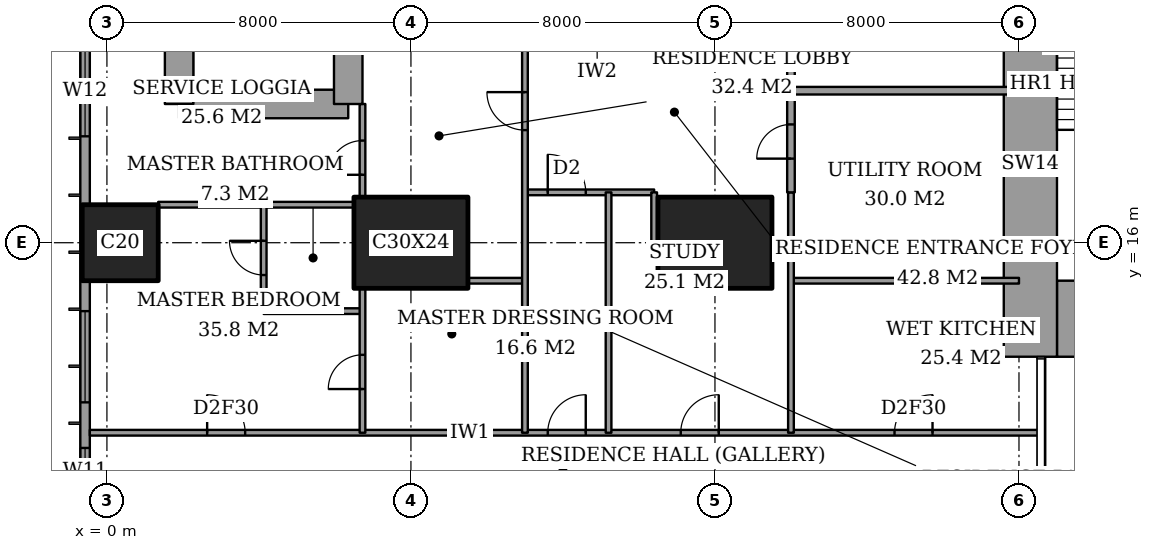
"""IFC4 building model, lengths in metres.
Left out: names, types, materials, properties, quantities, classifications, styles, units other than length and angle.
Written with IfcOpenShell. Run it as: python <this file> out.ifc"""

import sys

from ifc_helpers import new_model, si_unit, direction, frame, frame_2d, origin, origin_2d, place, context, subcontext, project, spatial, rectangle, extrude, element, fill, save


model = new_model("IFC4")
c1 = context("Model", 3, precision=1e-05, world=origin(), true_north=direction((0.0, 1.0)))
c2 = subcontext(c1, "Body", "Model", "MODEL_VIEW")
j1 = project(units=[si_unit("LENGTHUNIT", "METRE"), si_unit("PLANEANGLEUNIT", "RADIAN")], contexts=[c1])
p1 = place(None, origin())
s1 = spatial("IfcSite", under=j1, at=p1, CompositionType="ELEMENT")
p2 = place(p1, origin())
s2 = spatial("IfcBuilding", under=s1, at=p2, CompositionType="ELEMENT")
p3 = place(p2, frame((0.0, 0.0, 146.6)))
s3 = spatial("IfcBuildingStorey", under=s2, at=p3, CompositionType="ELEMENT", Elevation=146.6)
p4 = place(p3, frame((0.35, 16.0, 0.0), z_axis=(0.0, 0.0, 1.0), x_axis=(1.0, 0.0, 0.0)))
e1 = element("IfcColumn", 1, at=p4, inside=s3, PredefinedType="COLUMN", context=c2, shape_type="SweptSolid", body=[
    extrude(rectangle(XDim=2.0, YDim=2.0, at=origin_2d()), origin(), (0.0, 0.0, 1.0), 3.6),
])
for number, where, z_axis, x_axis in (
    (2, (8.0, 16.0, 0.0), (0.0, 0.0, 1.0), (1.0, 0.0, 0.0)),
    (3, (16.0, 16.0, 0.0), (0.0, 0.0, 1.0), (1.0, 0.0, 0.0)),
):
    element("IfcColumn", number, at=place(p3, frame(where, z_axis=z_axis, x_axis=x_axis)), inside=s3, PredefinedType="COLUMN", context=c2, shape_type="SweptSolid", body=[
        extrude(rectangle(XDim=3.0, YDim=2.4, at=origin_2d()), origin(), (0.0, 0.0, 1.0), 3.6),
    ])
p5 = place(p3, frame((25.0, 14.0, 0.0), z_axis=(0.0, 0.0, 1.0), x_axis=(1.0, 0.0, 0.0)))
e4 = element("IfcWall", 4, at=p5, inside=s3, PredefinedType="SHEAR", context=c2, shape_type="SweptSolid", body=[
    extrude(rectangle(XDim=3.15, YDim=2.0, at=frame_2d((1.575, 0.0))), origin(), (0.0, 0.0, 1.0), 3.6),
])
p6 = place(p3, frame((24.3, 13.0, 0.0), z_axis=(0.0, 0.0, 1.0), x_axis=(0.0, 1.0, 0.0)))
e5 = element("IfcWall", 5, at=p6, inside=s3, PredefinedType="SHEAR", context=c2, shape_type="SweptSolid", body=[
    extrude(rectangle(XDim=10.15, YDim=1.4, at=frame_2d((5.075, 0.0))), origin(), (0.0, 0.0, 1.0), 3.6),
])
p7 = place(p3, frame((1.9, 19.65, 0.0), z_axis=(0.0, 0.0, 1.0), x_axis=(1.0, 0.0, 0.0)))
e6 = element("IfcWall", 6, at=p7, inside=s3, PredefinedType="SHEAR", context=c2, shape_type="SweptSolid", body=[
    extrude(rectangle(XDim=4.45, YDim=0.75, at=frame_2d((2.225, 0.0))), origin(), (0.0, 0.0, 1.0), 3.6),
])
p8 = place(p3, frame((6.35, 19.65, 0.0), z_axis=(0.0, 0.0, 1.0), x_axis=(0.0, 1.0, 0.0)))
e7 = element("IfcWall", 7, at=p8, inside=s3, PredefinedType="SHEAR", context=c2, shape_type="SweptSolid", body=[
    extrude(rectangle(XDim=8.7, YDim=0.75, at=frame_2d((4.35, 0.0))), origin(), (0.0, 0.0, 1.0), 3.6),
])
p9 = place(p8, frame((6.725, 0.0, 0.0)))
e8 = element("IfcOpeningElement", 8, at=p9, cuts=e7, PredefinedType="OPENING", context=c2, shape_type="SweptSolid", body=[
    extrude(rectangle(XDim=1.0, YDim=2.1, at=frame_2d((0.5, 1.05))), frame((0.0, 0.385, 0.0), z_axis=(0.0, -1.0, 0.0), x_axis=(1.0, 0.0, 0.0)), (0.0, 0.0, 1.0), 0.77),
])
p10 = place(p3, frame((1.9, 28.35, 0.0), z_axis=(0.0, 0.0, 1.0), x_axis=(0.0, -1.0, 0.0)))
e9 = element("IfcWall", 9, at=p10, inside=s3, PredefinedType="SHEAR", context=c2, shape_type="SweptSolid", body=[
    extrude(rectangle(XDim=8.7, YDim=0.75, at=frame_2d((4.35, 0.0))), origin(), (0.0, 0.0, 1.0), 3.6),
])
p11 = place(p3, frame((-0.575, 44.825, 0.0), z_axis=(0.0, 0.0, 1.0), x_axis=(0.0, -1.0, 0.0)))
e10 = element("IfcWall", 10, at=p11, inside=s3, PredefinedType="SOLIDWALL", context=c2, shape_type="SweptSolid", body=[
    extrude(rectangle(XDim=41.65, YDim=0.25, at=frame_2d((20.825, 0.0))), origin(), (0.0, 0.0, 1.0), 3.6),
])
p12 = place(p11, frame((0.775, 0.0, 0.4)))
e11 = element("IfcOpeningElement", 11, at=p12, cuts=e10, PredefinedType="OPENING", context=c2, shape_type="SweptSolid", body=[
    extrude(rectangle(XDim=2.4, YDim=2.2, at=frame_2d((1.2, 1.1))), frame((0.0, 0.135, 0.0), z_axis=(0.0, -1.0, 0.0), x_axis=(1.0, 0.0, 0.0)), (0.0, 0.0, 1.0), 0.27),
])
p13 = place(p11, frame((6.1, 0.0, 0.4)))
e12 = element("IfcOpeningElement", 12, at=p13, cuts=e10, PredefinedType="OPENING", context=c2, shape_type="SweptSolid", body=[
    extrude(rectangle(XDim=1.2, YDim=2.2, at=frame_2d((0.6, 1.1))), frame((0.0, 0.135, 0.0), z_axis=(0.0, -1.0, 0.0), x_axis=(1.0, 0.0, 0.0)), (0.0, 0.0, 1.0), 0.27),
])
p14 = place(p11, frame((8.425, 0.0, 0.4)))
e13 = element("IfcOpeningElement", 13, at=p14, cuts=e10, PredefinedType="OPENING", context=c2, shape_type="SweptSolid", body=[
    extrude(rectangle(XDim=2.4, YDim=2.2, at=frame_2d((1.2, 1.1))), frame((0.0, 0.135, 0.0), z_axis=(0.0, -1.0, 0.0), x_axis=(1.0, 0.0, 0.0)), (0.0, 0.0, 1.0), 0.27),
])
p15 = place(p11, frame((15.625, 0.0, 0.4)))
e14 = element("IfcOpeningElement", 14, at=p15, cuts=e10, PredefinedType="OPENING", context=c2, shape_type="SweptSolid", body=[
    extrude(rectangle(XDim=2.4, YDim=2.2, at=frame_2d((1.2, 1.1))), frame((0.0, 0.135, 0.0), z_axis=(0.0, -1.0, 0.0), x_axis=(1.0, 0.0, 0.0)), (0.0, 0.0, 1.0), 0.27),
])
p16 = place(p11, frame((23.625, 0.0, 0.4)))
e15 = element("IfcOpeningElement", 15, at=p16, cuts=e10, PredefinedType="OPENING", context=c2, shape_type="SweptSolid", body=[
    extrude(rectangle(XDim=2.4, YDim=2.2, at=frame_2d((1.2, 1.1))), frame((0.0, 0.135, 0.0), z_axis=(0.0, -1.0, 0.0), x_axis=(1.0, 0.0, 0.0)), (0.0, 0.0, 1.0), 0.27),
])
p17 = place(p11, frame((30.625, 0.0, 0.4)))
e16 = element("IfcOpeningElement", 16, at=p17, cuts=e10, PredefinedType="OPENING", context=c2, shape_type="SweptSolid", body=[
    extrude(rectangle(XDim=2.4, YDim=2.2, at=frame_2d((1.2, 1.1))), frame((0.0, 0.135, 0.0), z_axis=(0.0, -1.0, 0.0), x_axis=(1.0, 0.0, 0.0)), (0.0, 0.0, 1.0), 0.27),
])
p18 = place(p11, frame((34.225, 0.0, 0.4)))
e17 = element("IfcOpeningElement", 17, at=p18, cuts=e10, PredefinedType="OPENING", context=c2, shape_type="SweptSolid", body=[
    extrude(rectangle(XDim=1.2, YDim=2.2, at=frame_2d((0.6, 1.1))), frame((0.0, 0.135, 0.0), z_axis=(0.0, -1.0, 0.0), x_axis=(1.0, 0.0, 0.0)), (0.0, 0.0, 1.0), 0.27),
])
p19 = place(p11, frame((38.475, 0.0, 0.4)))
e18 = element("IfcOpeningElement", 18, at=p19, cuts=e10, PredefinedType="OPENING", context=c2, shape_type="SweptSolid", body=[
    extrude(rectangle(XDim=2.4, YDim=2.2, at=frame_2d((1.2, 1.1))), frame((0.0, 0.135, 0.0), z_axis=(0.0, -1.0, 0.0), x_axis=(1.0, 0.0, 0.0)), (0.0, 0.0, 1.0), 0.27),
])
p20 = place(p3, frame((-0.45, 11.0, 0.0), z_axis=(0.0, 0.0, 1.0), x_axis=(1.0, 0.0, 0.0)))
e19 = element("IfcWall", 19, at=p20, inside=s3, PredefinedType="PARTITIONING", context=c2, shape_type="SweptSolid", body=[
    extrude(rectangle(XDim=25.011, YDim=0.15, at=frame_2d((12.505, 0.0))), origin(), (0.0, 0.0, 1.0), 3.35),
])
p21 = place(p20, frame((12.05, 0.0, 0.0)))
e20 = element("IfcOpeningElement", 20, at=p21, cuts=e19, PredefinedType="OPENING", context=c2, shape_type="SweptSolid", body=[
    extrude(rectangle(XDim=1.0, YDim=2.1, at=frame_2d((0.5, 1.05))), frame((0.0, 0.085, 0.0), z_axis=(0.0, -1.0, 0.0), x_axis=(1.0, 0.0, 0.0)), (0.0, 0.0, 1.0), 0.17),
])
p22 = place(p20, frame((3.087, 0.0, 0.0)))
e21 = element("IfcOpeningElement", 21, at=p22, cuts=e19, PredefinedType="OPENING", context=c2, shape_type="SweptSolid", body=[
    extrude(rectangle(XDim=1.0, YDim=2.1, at=frame_2d((0.5, 1.05))), frame((0.0, 0.085, 0.0), z_axis=(0.0, -1.0, 0.0), x_axis=(1.0, 0.0, 0.0)), (0.0, 0.0, 1.0), 0.17),
])
p23 = place(p20, frame((15.55, 0.0, 0.0)))
e22 = element("IfcOpeningElement", 22, at=p23, cuts=e19, PredefinedType="OPENING", context=c2, shape_type="SweptSolid", body=[
    extrude(rectangle(XDim=1.0, YDim=2.1, at=frame_2d((0.5, 1.05))), frame((0.0, 0.085, 0.0), z_axis=(0.0, -1.0, 0.0), x_axis=(1.0, 0.0, 0.0)), (0.0, 0.0, 1.0), 0.17),
])
p24 = place(p20, frame((21.175, 0.0, 0.0)))
e23 = element("IfcOpeningElement", 23, at=p24, cuts=e19, PredefinedType="OPENING", context=c2, shape_type="SweptSolid", body=[
    extrude(rectangle(XDim=1.0, YDim=2.1, at=frame_2d((0.5, 1.05))), frame((0.0, 0.085, 0.0), z_axis=(0.0, -1.0, 0.0), x_axis=(1.0, 0.0, 0.0)), (0.0, 0.0, 1.0), 0.17),
])
p25 = place(p3, frame((4.125, 14.2, 0.0), z_axis=(0.0, 0.0, 1.0), x_axis=(1.0, 0.0, 0.0)))
e24 = element("IfcWall", 24, at=p25, inside=s3, PredefinedType="PARTITIONING", context=c2, shape_type="SweptSolid", body=[
    extrude(rectangle(XDim=2.6, YDim=0.15, at=frame_2d((1.3, 0.0))), origin(), (0.0, 0.0, 1.0), 3.35),
])
p26 = place(p3, frame((9.5, 15.0, 0.0), z_axis=(0.0, 0.0, 1.0), x_axis=(1.0, 0.0, 0.0)))
e25 = element("IfcWall", 25, at=p26, inside=s3, PredefinedType="PARTITIONING", context=c2, shape_type="SweptSolid", body=[
    extrude(rectangle(XDim=1.5, YDim=0.15, at=frame_2d((0.75, 0.0))), origin(), (0.0, 0.0, 1.0), 3.35),
])
p27 = place(p3, frame((18.0, 15.0, 0.0), z_axis=(0.0, 0.0, 1.0), x_axis=(1.0, 0.0, 0.0)))
e26 = element("IfcWall", 26, at=p27, inside=s3, PredefinedType="PARTITIONING", context=c2, shape_type="SweptSolid", body=[
    extrude(rectangle(XDim=6.0, YDim=0.15, at=frame_2d((3.0, 0.0))), origin(), (0.0, 0.0, 1.0), 3.35),
])
p28 = place(p3, frame((17.5, 15.875, 0.0), z_axis=(0.0, 0.0, 1.0), x_axis=(1.0, 0.0, 0.0)))
e27 = element("IfcWall", 27, at=p28, inside=s3, PredefinedType="PARTITIONING", context=c2, shape_type="SweptSolid", body=[
    extrude(rectangle(XDim=0.5, YDim=0.15, at=frame_2d((0.25, 0.0))), origin(), (0.0, 0.0, 1.0), 2.634),
])
p29 = place(p3, frame((1.35, 17.0, 0.0), z_axis=(0.0, 0.0, 1.0), x_axis=(1.0, 0.0, 0.0)))
e28 = element("IfcWall", 28, at=p29, inside=s3, PredefinedType="PARTITIONING", context=c2, shape_type="SweptSolid", body=[
    extrude(rectangle(XDim=5.15, YDim=0.15, at=frame_2d((2.575, 0.0))), origin(), (0.0, 0.0, 1.0), 3.35),
])
p30 = place(p3, frame((11.0, 17.325, 0.0), z_axis=(0.0, 0.0, 1.0), x_axis=(1.0, 0.0, 0.0)))
e29 = element("IfcWall", 29, at=p30, inside=s3, PredefinedType="PARTITIONING", context=c2, shape_type="SweptSolid", body=[
    extrude(rectangle(XDim=3.4, YDim=0.15, at=frame_2d((1.7, 0.0))), origin(), (0.0, 0.0, 1.0), 3.35),
])
p31 = place(p30, frame((0.6, 0.0, 0.0)))
e30 = element("IfcOpeningElement", 30, at=p31, cuts=e29, PredefinedType="OPENING", context=c2, shape_type="SweptSolid", body=[
    extrude(rectangle(XDim=1.0, YDim=2.1, at=frame_2d((0.5, 1.05))), frame((0.0, 0.085, 0.0), z_axis=(0.0, -1.0, 0.0), x_axis=(1.0, 0.0, 0.0)), (0.0, 0.0, 1.0), 0.17),
])
p32 = place(p3, frame((18.0, 20.0, 0.0), z_axis=(0.0, 0.0, 1.0), x_axis=(1.0, 0.0, 0.0)))
e31 = element("IfcWall", 31, at=p32, inside=s3, PredefinedType="PARTITIONING", context=c2, shape_type="SweptSolid", body=[
    extrude(rectangle(XDim=6.0, YDim=0.2, at=frame_2d((3.0, 0.0))), origin(), (0.0, 0.0, 1.0), 3.35),
])
p33 = place(p3, frame((4.125, 14.2, 0.0), z_axis=(0.0, 0.0, 1.0), x_axis=(0.0, 1.0, 0.0)))
e32 = element("IfcWall", 32, at=p33, inside=s3, PredefinedType="PARTITIONING", context=c2, shape_type="SweptSolid", body=[
    extrude(rectangle(XDim=2.8, YDim=0.15, at=frame_2d((1.4, 0.0))), origin(), (0.0, 0.0, 1.0), 3.35),
])
p34 = place(p33, frame((0.95, 0.0, 0.0)))
e33 = element("IfcOpeningElement", 33, at=p34, cuts=e32, PredefinedType="OPENING", context=c2, shape_type="SweptSolid", body=[
    extrude(rectangle(XDim=0.9, YDim=2.1, at=frame_2d((0.45, 1.05))), frame((0.0, 0.085, 0.0), z_axis=(0.0, -1.0, 0.0), x_axis=(1.0, 0.0, 0.0)), (0.0, 0.0, 1.0), 0.17),
])
p35 = place(p3, frame((6.725, 11.0, 0.0), z_axis=(0.0, 0.0, 1.0), x_axis=(0.0, 1.0, 0.0)))
e34 = element("IfcWall", 34, at=p35, inside=s3, PredefinedType="PARTITIONING", context=c2, shape_type="SweptSolid", body=[
    extrude(rectangle(XDim=3.8, YDim=0.15, at=frame_2d((1.9, 0.0))), origin(), (0.0, 0.0, 1.0), 3.35),
])
p36 = place(p35, frame((1.15, 0.0, 0.0)))
e35 = element("IfcOpeningElement", 35, at=p36, cuts=e34, PredefinedType="OPENING", context=c2, shape_type="SweptSolid", body=[
    extrude(rectangle(XDim=0.9, YDim=2.1, at=frame_2d((0.45, 1.05))), frame((0.0, 0.085, 0.0), z_axis=(0.0, -1.0, 0.0), x_axis=(1.0, 0.0, 0.0)), (0.0, 0.0, 1.0), 0.17),
])
p37 = place(p3, frame((6.725, 17.2, 0.0), z_axis=(0.0, 0.0, 1.0), x_axis=(0.0, 1.0, 0.0)))
e36 = element("IfcWall", 36, at=p37, inside=s3, PredefinedType="PARTITIONING", context=c2, shape_type="SweptSolid", body=[
    extrude(rectangle(XDim=2.45, YDim=0.15, at=frame_2d((1.225, 0.0))), origin(), (0.0, 0.0, 1.0), 3.35),
])
p38 = place(p37, frame((0.587, 0.0, 0.0)))
e37 = element("IfcOpeningElement", 37, at=p38, cuts=e36, PredefinedType="OPENING", context=c2, shape_type="SweptSolid", body=[
    extrude(rectangle(XDim=0.9, YDim=2.1, at=frame_2d((0.45, 1.05))), frame((0.0, 0.085, 0.0), z_axis=(0.0, -1.0, 0.0), x_axis=(1.0, 0.0, 0.0)), (0.0, 0.0, 1.0), 0.17),
])
p39 = place(p3, frame((11.0, 11.0, 0.0), z_axis=(0.0, 0.0, 1.0), x_axis=(0.0, 1.0, 0.0)))
e38 = element("IfcWall", 38, at=p39, inside=s3, PredefinedType="PARTITIONING", context=c2, shape_type="SweptSolid", body=[
    extrude(rectangle(XDim=10.6, YDim=0.15, at=frame_2d((5.3, 0.0))), origin(), (0.0, 0.0, 1.0), 3.35),
])
p40 = place(p39, frame((7.962, 0.0, 0.0)))
e39 = element("IfcOpeningElement", 39, at=p40, cuts=e38, PredefinedType="OPENING", context=c2, shape_type="SweptSolid", body=[
    extrude(rectangle(XDim=1.0, YDim=2.1, at=frame_2d((0.5, 1.05))), frame((0.0, 0.085, 0.0), z_axis=(0.0, -1.0, 0.0), x_axis=(1.0, 0.0, 0.0)), (0.0, 0.0, 1.0), 0.17),
])
p41 = place(p3, frame((13.2, 11.0, 0.0), z_axis=(0.0, 0.0, 1.0), x_axis=(0.0, 1.0, 0.0)))
e40 = element("IfcWall", 40, at=p41, inside=s3, PredefinedType="PARTITIONING", context=c2, shape_type="SweptSolid", body=[
    extrude(rectangle(XDim=6.325, YDim=0.15, at=frame_2d((3.163, 0.0))), origin(), (0.0, 0.0, 1.0), 3.35),
])
p42 = place(p3, frame((14.4, 15.875, 0.0), z_axis=(0.0, 0.0, 1.0), x_axis=(0.0, 1.0, 0.0)))
e41 = element("IfcWall", 41, at=p42, inside=s3, PredefinedType="PARTITIONING", context=c2, shape_type="SweptSolid", body=[
    extrude(rectangle(XDim=1.45, YDim=0.15, at=frame_2d((0.725, 0.0))), origin(), (0.0, 0.0, 1.0), 3.35),
])
p43 = place(p3, frame((18.0, 17.325, 0.0), z_axis=(0.0, 0.0, 1.0), x_axis=(0.0, 1.0, 0.0)))
e42 = element("IfcWall", 42, at=p43, inside=s3, PredefinedType="PARTITIONING", context=c2, shape_type="SweptSolid", body=[
    extrude(rectangle(XDim=6.675, YDim=0.2, at=frame_2d((3.337, 0.0))), origin(), (0.0, 0.0, 1.0), 3.35),
])
p44 = place(p43, frame((4.075, 0.0, 0.0)))
e43 = element("IfcOpeningElement", 43, at=p44, cuts=e42, PredefinedType="OPENING", context=c2, shape_type="SweptSolid", body=[
    extrude(rectangle(XDim=1.2, YDim=2.4, at=frame_2d((0.6, 1.2))), frame((0.0, 0.11, 0.0), z_axis=(0.0, -1.0, 0.0), x_axis=(1.0, 0.0, 0.0)), (0.0, 0.0, 1.0), 0.22),
])
p45 = place(p43, frame((0.887, 0.0, 0.0)))
e44 = element("IfcOpeningElement", 44, at=p45, cuts=e42, PredefinedType="OPENING", context=c2, shape_type="SweptSolid", body=[
    extrude(rectangle(XDim=0.9, YDim=2.1, at=frame_2d((0.45, 1.05))), frame((0.0, 0.11, 0.0), z_axis=(0.0, -1.0, 0.0), x_axis=(1.0, 0.0, 0.0)), (0.0, 0.0, 1.0), 0.22),
])
p46 = place(p3, frame((18.0, 11.0, 0.0), z_axis=(0.0, 0.0, 1.0), x_axis=(0.0, 1.0, 0.0)))
e45 = element("IfcWall", 45, at=p46, inside=s3, PredefinedType="PARTITIONING", context=c2, shape_type="SweptSolid", body=[
    extrude(rectangle(XDim=6.325, YDim=0.15, at=frame_2d((3.163, 0.0))), origin(), (0.0, 0.0, 1.0), 3.35),
])
p47 = place(p16, origin())
e46 = element("IfcWindow", 46, at=p47, inside=s3, PartitioningType="SINGLE_PANEL", PredefinedType="WINDOW", context=c2, shape_type="SweptSolid", body=[
    extrude(rectangle(XDim=2.4, YDim=2.2, at=frame_2d((1.2, 1.1))), frame((0.0, 0.03, 0.0), z_axis=(0.0, -1.0, 0.0), x_axis=(1.0, 0.0, 0.0)), (0.0, 0.0, 1.0), 0.06),
])
fill(e15, e46)
p48 = place(p17, origin())
e47 = element("IfcWindow", 47, at=p48, inside=s3, PartitioningType="SINGLE_PANEL", PredefinedType="WINDOW", context=c2, shape_type="SweptSolid", body=[
    extrude(rectangle(XDim=2.4, YDim=2.2, at=frame_2d((1.2, 1.1))), frame((0.0, 0.03, 0.0), z_axis=(0.0, -1.0, 0.0), x_axis=(1.0, 0.0, 0.0)), (0.0, 0.0, 1.0), 0.06),
])
fill(e16, e47)
p49 = place(p18, origin())
e48 = element("IfcWindow", 48, at=p49, inside=s3, PartitioningType="SINGLE_PANEL", PredefinedType="WINDOW", context=c2, shape_type="SweptSolid", body=[
    extrude(rectangle(XDim=1.2, YDim=2.2, at=frame_2d((0.6, 1.1))), frame((0.0, 0.03, 0.0), z_axis=(0.0, -1.0, 0.0), x_axis=(1.0, 0.0, 0.0)), (0.0, 0.0, 1.0), 0.06),
])
fill(e17, e48)
p50 = place(p21, origin())
e49 = element("IfcDoor", 49, at=p50, inside=s3, OperationType="SINGLE_SWING_LEFT", PredefinedType="DOOR", context=c2, shape_type="SweptSolid", body=[
    extrude(rectangle(XDim=1.0, YDim=2.1, at=frame_2d((0.5, 1.05))), frame((0.0, 0.025, 0.0), z_axis=(0.0, -1.0, 0.0), x_axis=(1.0, 0.0, 0.0)), (0.0, 0.0, 1.0), 0.05),
])
fill(e20, e49)
p51 = place(p34, origin())
e50 = element("IfcDoor", 50, at=p51, inside=s3, OperationType="SINGLE_SWING_LEFT", PredefinedType="DOOR", context=c2, shape_type="SweptSolid", body=[
    extrude(rectangle(XDim=0.9, YDim=2.1, at=frame_2d((0.45, 1.05))), frame((0.0, 0.025, 0.0), z_axis=(0.0, -1.0, 0.0), x_axis=(1.0, 0.0, 0.0)), (0.0, 0.0, 1.0), 0.05),
])
fill(e33, e50)
p52 = place(p22, origin())
e51 = element("IfcDoor", 51, at=p52, inside=s3, OperationType="SINGLE_SWING_RIGHT", PredefinedType="DOOR", context=c2, shape_type="SweptSolid", body=[
    extrude(rectangle(XDim=1.0, YDim=2.1, at=frame_2d((0.5, 1.05))), frame((0.0, 0.025, 0.0), z_axis=(0.0, -1.0, 0.0), x_axis=(1.0, 0.0, 0.0)), (0.0, 0.0, 1.0), 0.05),
])
fill(e21, e51)
p53 = place(p38, origin())
e52 = element("IfcDoor", 52, at=p53, inside=s3, OperationType="SINGLE_SWING_RIGHT", PredefinedType="DOOR", context=c2, shape_type="SweptSolid", body=[
    extrude(rectangle(XDim=0.9, YDim=2.1, at=frame_2d((0.45, 1.05))), frame((0.0, 0.025, 0.0), z_axis=(0.0, -1.0, 0.0), x_axis=(1.0, 0.0, 0.0)), (0.0, 0.0, 1.0), 0.05),
])
fill(e37, e52)
p54 = place(p36, origin())
e53 = element("IfcDoor", 53, at=p54, inside=s3, OperationType="SINGLE_SWING_RIGHT", PredefinedType="DOOR", context=c2, shape_type="SweptSolid", body=[
    extrude(rectangle(XDim=0.9, YDim=2.1, at=frame_2d((0.45, 1.05))), frame((0.0, 0.025, 0.0), z_axis=(0.0, -1.0, 0.0), x_axis=(1.0, 0.0, 0.0)), (0.0, 0.0, 1.0), 0.05),
])
fill(e35, e53)
p55 = place(p40, origin())
e54 = element("IfcDoor", 54, at=p55, inside=s3, OperationType="SINGLE_SWING_LEFT", PredefinedType="DOOR", context=c2, shape_type="SweptSolid", body=[
    extrude(rectangle(XDim=1.0, YDim=2.1, at=frame_2d((0.5, 1.05))), frame((0.0, 0.025, 0.0), z_axis=(0.0, -1.0, 0.0), x_axis=(1.0, 0.0, 0.0)), (0.0, 0.0, 1.0), 0.05),
])
fill(e39, e54)
p56 = place(p31, origin())
e55 = element("IfcDoor", 55, at=p56, inside=s3, OperationType="SINGLE_SWING_RIGHT", PredefinedType="DOOR", context=c2, shape_type="SweptSolid", body=[
    extrude(rectangle(XDim=1.0, YDim=2.1, at=frame_2d((0.5, 1.05))), frame((0.0, 0.025, 0.0), z_axis=(0.0, -1.0, 0.0), x_axis=(1.0, 0.0, 0.0)), (0.0, 0.0, 1.0), 0.05),
])
fill(e30, e55)
p57 = place(p23, origin())
e56 = element("IfcDoor", 56, at=p57, inside=s3, OperationType="SINGLE_SWING_LEFT", PredefinedType="DOOR", context=c2, shape_type="SweptSolid", body=[
    extrude(rectangle(XDim=1.0, YDim=2.1, at=frame_2d((0.5, 1.05))), frame((0.0, 0.025, 0.0), z_axis=(0.0, -1.0, 0.0), x_axis=(1.0, 0.0, 0.0)), (0.0, 0.0, 1.0), 0.05),
])
fill(e22, e56)
p58 = place(p24, origin())
e57 = element("IfcDoor", 57, at=p58, inside=s3, OperationType="SINGLE_SWING_LEFT", PredefinedType="DOOR", context=c2, shape_type="SweptSolid", body=[
    extrude(rectangle(XDim=1.0, YDim=2.1, at=frame_2d((0.5, 1.05))), frame((0.0, 0.025, 0.0), z_axis=(0.0, -1.0, 0.0), x_axis=(1.0, 0.0, 0.0)), (0.0, 0.0, 1.0), 0.05),
])
fill(e23, e57)
p59 = place(p45, origin())
e58 = element("IfcDoor", 58, at=p59, inside=s3, OperationType="SINGLE_SWING_RIGHT", PredefinedType="DOOR", context=c2, shape_type="SweptSolid", body=[
    extrude(rectangle(XDim=0.9, YDim=2.1, at=frame_2d((0.45, 1.05))), frame((0.0, 0.025, 0.0), z_axis=(0.0, -1.0, 0.0), x_axis=(1.0, 0.0, 0.0)), (0.0, 0.0, 1.0), 0.05),
])
fill(e44, e58)
save(model, sys.argv[1])
